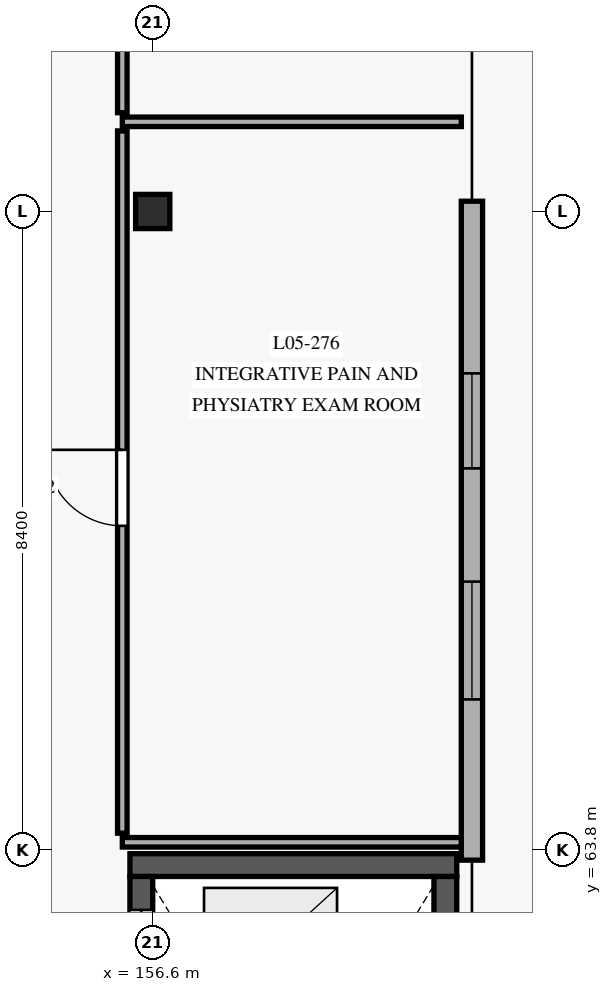
"""IFC4 building model, lengths in metres.
Left out: names, types, materials, properties, quantities, classifications, styles, units other than length and angle.
Written with IfcOpenShell. Run it as: python <this file> out.ifc"""

import sys

from ifc_helpers import new_model, si_unit, direction, frame, frame_2d, origin, origin_with_axes, origin_2d, place, context, subcontext, project, spatial, rectangle, extrude, element, fill, save


model = new_model("IFC4")
c1 = context("Model", 3, precision=1e-05, world=origin(), true_north=direction((0.0, 1.0)))
c2 = subcontext(c1, "Body", "Model", "MODEL_VIEW")
j1 = project(units=[si_unit("LENGTHUNIT", "METRE"), si_unit("PLANEANGLEUNIT", "RADIAN")], contexts=[c1])
p1 = place(None, origin())
s1 = spatial("IfcSite", under=j1, at=p1, CompositionType="ELEMENT")
p2 = place(p1, origin())
s2 = spatial("IfcBuilding", under=s1, at=p2, CompositionType="ELEMENT")
p3 = place(p2, frame((0.0, 0.0, 17.55)))
s3 = spatial("IfcBuildingStorey", under=s2, at=p3, CompositionType="ELEMENT", Elevation=17.55)
p4 = place(p3, frame((156.6, 72.2, 0.0), z_axis=(0.0, 0.0, 1.0), x_axis=(1.0, 0.0, 0.0)))
e1 = element("IfcColumn", 1, at=p4, inside=s3, PredefinedType="COLUMN", context=c2, shape_type="SweptSolid", body=[
    extrude(rectangle(XDim=0.45, YDim=0.45, at=origin_2d()), origin(), (0.0, 0.0, 1.0), 4.05),
])
p5 = place(p3, frame((160.6, 63.6, 0.0), z_axis=(0.0, 0.0, 1.0), x_axis=(-1.0, 0.0, 0.0)))
e2 = element("IfcWall", 2, at=p5, inside=s3, PredefinedType="SHEAR", context=c2, shape_type="SweptSolid", body=[
    extrude(rectangle(XDim=4.3, YDim=0.3, at=frame_2d((2.15, 0.0))), origin(), (0.0, 0.0, 1.0), 3.84),
])
p6 = place(p3, frame((156.45, 63.45, 0.0), z_axis=(0.0, 0.0, 1.0), x_axis=(0.0, -1.0, 0.0)))
e3 = element("IfcWall", 3, at=p6, inside=s3, PredefinedType="SHEAR", context=c2, shape_type="SweptSolid", body=[
    extrude(rectangle(XDim=13.5, YDim=0.3, at=frame_2d((6.75, 0.0))), origin(), (0.0, 0.0, 1.0), 3.84),
])
p7 = place(p6, frame((12.2, 0.0, 0.0)))
e4 = element("IfcOpeningElement", 4, at=p7, cuts=e3, PredefinedType="OPENING", context=c2, shape_type="SweptSolid", body=[
    extrude(rectangle(XDim=1.1, YDim=2.2, at=frame_2d((0.55, 1.1))), frame((0.0, 0.16, 0.0), z_axis=(0.0, -1.0, 0.0), x_axis=(1.0, 0.0, 0.0)), (0.0, 0.0, 1.0), 0.32),
])
p8 = place(p6, frame((4.475, 0.0, 0.0)))
e5 = element("IfcOpeningElement", 5, at=p8, cuts=e3, PredefinedType="OPENING", context=c2, shape_type="SweptSolid", body=[
    extrude(rectangle(XDim=1.15, YDim=2.2, at=frame_2d((0.575, 1.1))), frame((0.0, 0.16, 0.0), z_axis=(0.0, -1.0, 0.0), x_axis=(1.0, 0.0, 0.0)), (0.0, 0.0, 1.0), 0.32),
])
p9 = place(p6, frame((2.34, 0.0, 0.0)))
e6 = element("IfcOpeningElement", 6, at=p9, cuts=e3, PredefinedType="OPENING", context=c2, shape_type="SweptSolid", body=[
    extrude(rectangle(XDim=1.02, YDim=2.15, at=frame_2d((0.51, 1.075))), frame((0.0, 0.16, 0.0), z_axis=(0.0, -1.0, 0.0), x_axis=(1.0, 0.0, 0.0)), (0.0, 0.0, 1.0), 0.32),
])
p10 = place(p6, frame((0.44, 0.0, 0.0)))
e7 = element("IfcOpeningElement", 7, at=p10, cuts=e3, PredefinedType="OPENING", context=c2, shape_type="SweptSolid", body=[
    extrude(rectangle(XDim=1.02, YDim=2.15, at=frame_2d((0.51, 1.075))), frame((0.0, 0.16, 0.0), z_axis=(0.0, -1.0, 0.0), x_axis=(1.0, 0.0, 0.0)), (0.0, 0.0, 1.0), 0.32),
])
p11 = place(p3, frame((160.45, 49.95, 0.0), z_axis=(0.0, 0.0, 1.0), x_axis=(0.0, 1.0, 0.0)))
e8 = element("IfcWall", 8, at=p11, inside=s3, PredefinedType="SHEAR", context=c2, shape_type="SweptSolid", body=[
    extrude(rectangle(XDim=13.5, YDim=0.3, at=frame_2d((6.75, 0.0))), origin(), (0.0, 0.0, 1.0), 3.84),
])
p12 = place(p3, frame((160.8, 63.665, 0.0), z_axis=(0.0, 0.0, 1.0), x_axis=(0.0, 1.0, 0.0)))
e9 = element("IfcWall", 9, at=p12, inside=s3, PredefinedType="SOLIDWALL", context=c2, shape_type="SweptSolid", body=[
    extrude(rectangle(XDim=8.67, YDim=0.28, at=frame_2d((4.335, 0.0))), origin(), (0.0, 0.0, 1.0), 3.84),
])
p13 = place(p12, frame((2.115, 0.0, 0.85)))
e10 = element("IfcOpeningElement", 10, at=p13, cuts=e9, PredefinedType="OPENING", context=c2, shape_type="SweptSolid", body=[
    extrude(rectangle(XDim=1.55, YDim=1.75, at=frame_2d((0.775, 0.875))), frame((0.0, 0.15, 0.0), z_axis=(0.0, -1.0, 0.0), x_axis=(1.0, 0.0, 0.0)), (0.0, 0.0, 1.0), 0.3),
])
p14 = place(p12, frame((5.155, 0.0, 0.85)))
e11 = element("IfcOpeningElement", 11, at=p14, cuts=e9, PredefinedType="OPENING", context=c2, shape_type="SweptSolid", body=[
    extrude(rectangle(XDim=1.25, YDim=1.75, at=frame_2d((0.625, 0.875))), frame((0.0, 0.15, 0.0), z_axis=(0.0, -1.0, 0.0), x_axis=(1.0, 0.0, 0.0)), (0.0, 0.0, 1.0), 0.3),
])
p15 = place(p3, frame((156.2, 64.02, 0.0), z_axis=(0.0, 0.0, 1.0), x_axis=(0.0, 1.0, 0.0)))
e12 = element("IfcWall", 12, at=p15, inside=s3, PredefinedType="PARTITIONING", context=c2, shape_type="SweptSolid", body=[
    extrude(rectangle(XDim=9.24, YDim=0.125, at=frame_2d((4.62, 0.0))), origin(), (0.0, 0.0, 1.0), 3.435),
])
p16 = place(p15, frame((4.044, 0.0, 0.0)))
e13 = element("IfcOpeningElement", 13, at=p16, cuts=e12, PredefinedType="OPENING", context=c2, shape_type="SweptSolid", body=[
    extrude(rectangle(XDim=1.0, YDim=2.15, at=frame_2d((0.5, 1.075))), frame((0.0, 0.073, 0.0), z_axis=(0.0, -1.0, 0.0), x_axis=(1.0, 0.0, 0.0)), (0.0, 0.0, 1.0), 0.145),
])
p17 = place(p3, frame((156.2, 63.9, 0.0), z_axis=(0.0, 0.0, 1.0), x_axis=(1.0, 0.0, 0.0)))
e14 = element("IfcWall", 14, at=p17, inside=s3, PredefinedType="PARTITIONING", context=c2, shape_type="SweptSolid", body=[
    extrude(rectangle(XDim=4.46, YDim=0.125, at=frame_2d((2.23, 0.0))), origin(), (0.0, 0.0, 1.0), 3.435),
])
p18 = place(p3, frame((156.2, 73.38, 0.0), z_axis=(0.0, 0.0, 1.0), x_axis=(1.0, 0.0, 0.0)))
e15 = element("IfcWall", 15, at=p18, inside=s3, PredefinedType="PARTITIONING", context=c2, shape_type="SweptSolid", body=[
    extrude(rectangle(XDim=4.46, YDim=0.125, at=frame_2d((2.23, 0.0))), origin(), (0.0, 0.0, 1.0), 3.455),
])
p19 = place(p3, frame((156.2, 73.5, 0.0), z_axis=(0.0, 0.0, 1.0), x_axis=(0.0, 1.0, 0.0)))
e16 = element("IfcWall", 16, at=p19, inside=s3, PredefinedType="PARTITIONING", context=c2, shape_type="SweptSolid", body=[
    extrude(rectangle(XDim=7.4, YDim=0.125, at=frame_2d((3.7, 0.0))), origin(), (0.0, 0.0, 1.0), 3.435),
])
p20 = place(p19, frame((3.173, 0.0, 0.0)))
e17 = element("IfcOpeningElement", 17, at=p20, cuts=e16, PredefinedType="OPENING", context=c2, shape_type="SweptSolid", body=[
    extrude(rectangle(XDim=0.9, YDim=2.12, at=frame_2d((0.45, 1.06))), frame((0.0, 0.073, 0.0), z_axis=(0.0, -1.0, 0.0), x_axis=(1.0, 0.0, 0.0)), (0.0, 0.0, 1.0), 0.145),
])
p21 = place(p10, origin_with_axes())
e18 = element("IfcDoor", 18, at=p21, inside=s3, OperationType="SLIDING_TO_LEFT", PredefinedType="DOOR", context=c2, shape_type="SweptSolid", body=[
    extrude(rectangle(XDim=1.02, YDim=2.15, at=frame_2d((0.51, 1.075))), frame((0.0, 0.025, 0.0), z_axis=(0.0, -1.0, 0.0), x_axis=(1.0, 0.0, 0.0)), (0.0, 0.0, 1.0), 0.05),
])
fill(e7, e18)
p22 = place(p13, origin_with_axes())
e19 = element("IfcWindow", 19, at=p22, inside=s3, PartitioningType="SINGLE_PANEL", PredefinedType="WINDOW", context=c2, shape_type="SweptSolid", body=[
    extrude(rectangle(XDim=1.55, YDim=1.75, at=frame_2d((0.775, 0.875))), frame((0.0, 0.03, 0.0), z_axis=(0.0, -1.0, 0.0), x_axis=(1.0, 0.0, 0.0)), (0.0, 0.0, 1.0), 0.06),
])
fill(e10, e19)
p23 = place(p14, origin_with_axes())
e20 = element("IfcWindow", 20, at=p23, inside=s3, PartitioningType="SINGLE_PANEL", PredefinedType="WINDOW", context=c2, shape_type="SweptSolid", body=[
    extrude(rectangle(XDim=1.25, YDim=1.75, at=frame_2d((0.625, 0.875))), frame((0.0, 0.03, 0.0), z_axis=(0.0, -1.0, 0.0), x_axis=(1.0, 0.0, 0.0)), (0.0, 0.0, 1.0), 0.06),
])
fill(e11, e20)
p24 = place(p16, frame((1.0, 0.0, 0.0), z_axis=(0.0, 0.0, 1.0), x_axis=(-1.0, 0.0, 0.0)))
e21 = element("IfcDoor", 21, at=p24, inside=s3, OperationType="SINGLE_SWING_LEFT", PredefinedType="DOOR", context=c2, shape_type="SweptSolid", body=[
    extrude(rectangle(XDim=1.0, YDim=2.15, at=frame_2d((0.5, 1.075))), frame((0.0, 0.025, 0.0), z_axis=(0.0, -1.0, 0.0), x_axis=(1.0, 0.0, 0.0)), (0.0, 0.0, 1.0), 0.05),
])
fill(e13, e21)
save(model, sys.argv[1])
